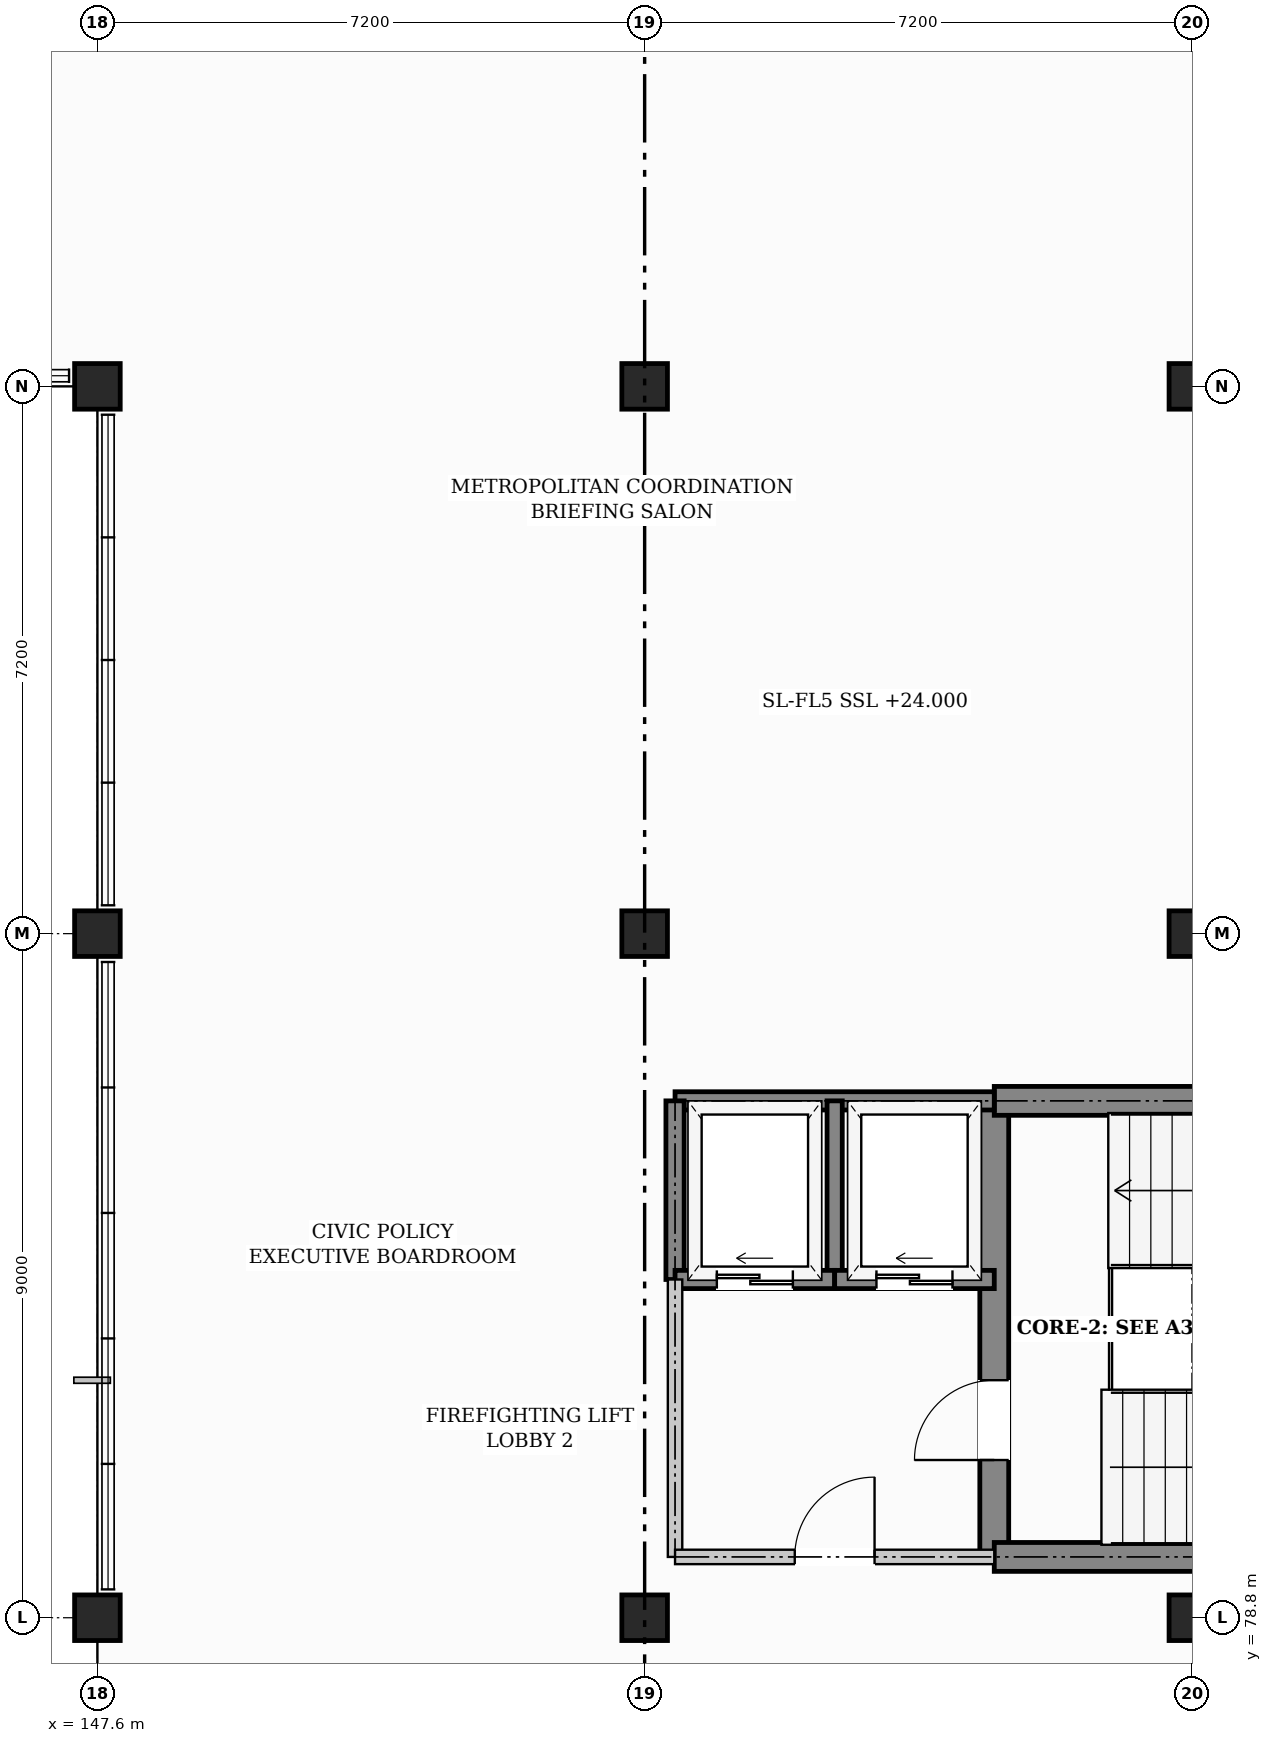
"""IFC4 building model, lengths in metres.
Left out: names, types, materials, properties, quantities, classifications, styles, units other than length and angle.
Written with IfcOpenShell. Run it as: python <this file> out.ifc"""

import sys

from ifc_helpers import new_model, si_unit, direction, frame, frame_2d, origin, origin_2d, place, context, subcontext, project, spatial, rectangle, extrude, element, fill, save


model = new_model("IFC4")
c1 = context("Model", 3, precision=1e-05, world=origin(), true_north=direction((0.0, 1.0)))
c2 = subcontext(c1, "Body", "Model", "MODEL_VIEW")
j1 = project(units=[si_unit("LENGTHUNIT", "METRE"), si_unit("PLANEANGLEUNIT", "RADIAN")], contexts=[c1])
p1 = place(None, origin())
s1 = spatial("IfcSite", under=j1, at=p1, CompositionType="ELEMENT")
p2 = place(p1, origin())
s2 = spatial("IfcBuilding", under=s1, at=p2, CompositionType="ELEMENT")
p3 = place(p2, frame((0.0, 0.0, 24.0)))
s3 = spatial("IfcBuildingStorey", under=s2, at=p3, CompositionType="ELEMENT", Elevation=24.0)
for number, where, z_axis, x_axis in (
    (1, (147.6, 78.8, 0.0), (0.0, 0.0, 1.0), (1.0, 0.0, 0.0)),
    (2, (147.6, 87.8, 0.0), (0.0, 0.0, 1.0), (1.0, 0.0, 0.0)),
    (3, (147.6, 95.0, 0.0), (0.0, 0.0, 1.0), (1.0, 0.0, 0.0)),
    (4, (154.8, 78.8, 0.0), (0.0, 0.0, 1.0), (1.0, 0.0, 0.0)),
    (5, (154.8, 87.8, 0.0), (0.0, 0.0, 1.0), (1.0, 0.0, 0.0)),
    (6, (154.8, 95.0, 0.0), (0.0, 0.0, 1.0), (1.0, 0.0, 0.0)),
    (7, (162.0, 78.8, 0.0), (0.0, 0.0, 1.0), (1.0, 0.0, 0.0)),
    (8, (162.0, 87.8, 0.0), (0.0, 0.0, 1.0), (1.0, 0.0, 0.0)),
    (9, (162.0, 95.0, 0.0), (0.0, 0.0, 1.0), (1.0, 0.0, 0.0)),
):
    element("IfcColumn", number, at=place(p3, frame(where, z_axis=z_axis, x_axis=x_axis)), inside=s3, PredefinedType="COLUMN", context=c2, shape_type="SweptSolid", body=[
        extrude(rectangle(XDim=0.6, YDim=0.6, at=origin_2d()), origin(), (0.0, 0.0, 1.0), 3.6),
    ])
p4 = place(p3, frame((159.4, 79.6, 0.0), z_axis=(0.0, 0.0, 1.0), x_axis=(0.0, 1.0, 0.0)))
e10 = element("IfcWall", 10, at=p4, inside=s3, PredefinedType="SHEAR", context=c2, shape_type="SweptSolid", body=[
    extrude(rectangle(XDim=6.0, YDim=0.38, at=frame_2d((3.0, 0.0))), origin(), (0.0, 0.0, 1.0), 3.34),
])
p5 = place(p4, frame((1.275, 0.0, 0.0)))
e11 = element("IfcOpeningElement", 11, at=p5, cuts=e10, PredefinedType="OPENING", context=c2, shape_type="SweptSolid", body=[
    extrude(rectangle(XDim=1.05, YDim=2.15, at=frame_2d((0.525, 1.075))), frame((0.0, 0.2, 0.0), z_axis=(0.0, -1.0, 0.0), x_axis=(1.0, 0.0, 0.0)), (0.0, 0.0, 1.0), 0.4),
])
for number, where, z_axis, x_axis in (
    (12, (159.4, 79.6, 0.0), (0.0, 0.0, 1.0), (1.0, 0.0, 0.0)),
    (13, (159.4, 85.6, 0.0), (0.0, 0.0, 1.0), (1.0, 0.0, 0.0)),
):
    element("IfcWall", number, at=place(p3, frame(where, z_axis=z_axis, x_axis=x_axis)), inside=s3, PredefinedType="SHEAR", context=c2, shape_type="SweptSolid", body=[
        extrude(rectangle(XDim=7.0, YDim=0.38, at=frame_2d((3.5, 0.0))), origin(), (0.0, 0.0, 1.0), 3.34),
    ])
p6 = place(p3, frame((155.2, 85.6, 0.0), z_axis=(0.0, 0.0, 1.0), x_axis=(1.0, 0.0, 0.0)))
e14 = element("IfcWall", 14, at=p6, inside=s3, PredefinedType="SHEAR", context=c2, shape_type="SweptSolid", body=[
    extrude(rectangle(XDim=4.2, YDim=0.24, at=frame_2d((2.1, 0.0))), origin(), (0.0, 0.0, 1.0), 3.34),
])
p7 = place(p3, frame((155.2, 83.25, 0.0), z_axis=(0.0, 0.0, 1.0), x_axis=(0.0, 1.0, 0.0)))
e15 = element("IfcWall", 15, at=p7, inside=s3, PredefinedType="SHEAR", context=c2, shape_type="SweptSolid", body=[
    extrude(rectangle(XDim=2.35, YDim=0.24, at=frame_2d((1.175, 0.0))), origin(), (0.0, 0.0, 1.0), 3.34),
])
p8 = place(p3, frame((157.3, 83.25, 0.0), z_axis=(0.0, 0.0, 1.0), x_axis=(0.0, 1.0, 0.0)))
e16 = element("IfcWall", 16, at=p8, inside=s3, PredefinedType="SHEAR", context=c2, shape_type="SweptSolid", body=[
    extrude(rectangle(XDim=2.35, YDim=0.2, at=frame_2d((1.175, 0.0))), origin(), (0.0, 0.0, 1.0), 3.34),
])
p9 = place(p3, frame((155.2, 83.25, 0.0), z_axis=(0.0, 0.0, 1.0), x_axis=(1.0, 0.0, 0.0)))
e17 = element("IfcWall", 17, at=p9, inside=s3, PredefinedType="SHEAR", context=c2, shape_type="SweptSolid", body=[
    extrude(rectangle(XDim=2.1, YDim=0.24, at=frame_2d((1.05, 0.0))), origin(), (0.0, 0.0, 1.0), 3.34),
])
p10 = place(p9, frame((0.55, 0.0, 0.0)))
e18 = element("IfcOpeningElement", 18, at=p10, cuts=e17, PredefinedType="OPENING", context=c2, shape_type="SweptSolid", body=[
    extrude(rectangle(XDim=1.0, YDim=2.1, at=frame_2d((0.5, 1.05))), frame((0.0, 0.13, 0.0), z_axis=(0.0, -1.0, 0.0), x_axis=(1.0, 0.0, 0.0)), (0.0, 0.0, 1.0), 0.26),
])
p11 = place(p3, frame((157.3, 83.25, 0.0), z_axis=(0.0, 0.0, 1.0), x_axis=(1.0, 0.0, 0.0)))
e19 = element("IfcWall", 19, at=p11, inside=s3, PredefinedType="SHEAR", context=c2, shape_type="SweptSolid", body=[
    extrude(rectangle(XDim=2.1, YDim=0.24, at=frame_2d((1.05, 0.0))), origin(), (0.0, 0.0, 1.0), 3.34),
])
p12 = place(p11, frame((0.55, 0.0, 0.0)))
e20 = element("IfcOpeningElement", 20, at=p12, cuts=e19, PredefinedType="OPENING", context=c2, shape_type="SweptSolid", body=[
    extrude(rectangle(XDim=1.0, YDim=2.1, at=frame_2d((0.5, 1.05))), frame((0.0, 0.13, 0.0), z_axis=(0.0, -1.0, 0.0), x_axis=(1.0, 0.0, 0.0)), (0.0, 0.0, 1.0), 0.26),
])
p13 = place(p3, frame((155.2, 79.6, 0.0), z_axis=(0.0, 0.0, 1.0), x_axis=(0.0, 1.0, 0.0)))
e21 = element("IfcWall", 21, at=p13, inside=s3, PredefinedType="PARTITIONING", context=c2, shape_type="SweptSolid", body=[
    extrude(rectangle(XDim=3.65, YDim=0.19, at=frame_2d((1.825, 0.0))), origin(), (0.0, 0.0, 1.0), 3.34),
])
p14 = place(p3, frame((155.2, 79.6, 0.0), z_axis=(0.0, 0.0, 1.0), x_axis=(1.0, 0.0, 0.0)))
e22 = element("IfcWall", 22, at=p14, inside=s3, PredefinedType="PARTITIONING", context=c2, shape_type="SweptSolid", body=[
    extrude(rectangle(XDim=4.2, YDim=0.19, at=frame_2d((2.1, 0.0))), origin(), (0.0, 0.0, 1.0), 3.34),
])
p15 = place(p14, frame((1.575, 0.0, 0.0)))
e23 = element("IfcOpeningElement", 23, at=p15, cuts=e22, PredefinedType="OPENING", context=c2, shape_type="SweptSolid", body=[
    extrude(rectangle(XDim=1.05, YDim=2.15, at=frame_2d((0.525, 1.075))), frame((0.0, 0.105, 0.0), z_axis=(0.0, -1.0, 0.0), x_axis=(1.0, 0.0, 0.0)), (0.0, 0.0, 1.0), 0.21),
])
p16 = place(p5, origin())
e24 = element("IfcDoor", 24, at=p16, inside=s3, OperationType="SINGLE_SWING_LEFT", PredefinedType="DOOR", context=c2, shape_type="SweptSolid", body=[
    extrude(rectangle(XDim=1.05, YDim=2.15, at=frame_2d((0.525, 1.075))), frame((0.0, 0.025, 0.0), z_axis=(0.0, -1.0, 0.0), x_axis=(1.0, 0.0, 0.0)), (0.0, 0.0, 1.0), 0.05),
])
fill(e11, e24)
p17 = place(p10, origin())
e25 = element("IfcDoor", 25, at=p17, inside=s3, OperationType="SLIDING_TO_LEFT", PredefinedType="DOOR", context=c2, shape_type="SweptSolid", body=[
    extrude(rectangle(XDim=1.0, YDim=2.1, at=frame_2d((0.5, 1.05))), frame((0.0, 0.025, 0.0), z_axis=(0.0, -1.0, 0.0), x_axis=(1.0, 0.0, 0.0)), (0.0, 0.0, 1.0), 0.05),
])
fill(e18, e25)
p18 = place(p12, origin())
e26 = element("IfcDoor", 26, at=p18, inside=s3, OperationType="SLIDING_TO_LEFT", PredefinedType="DOOR", context=c2, shape_type="SweptSolid", body=[
    extrude(rectangle(XDim=1.0, YDim=2.1, at=frame_2d((0.5, 1.05))), frame((0.0, 0.025, 0.0), z_axis=(0.0, -1.0, 0.0), x_axis=(1.0, 0.0, 0.0)), (0.0, 0.0, 1.0), 0.05),
])
fill(e20, e26)
p19 = place(p15, origin())
e27 = element("IfcDoor", 27, at=p19, inside=s3, OperationType="SINGLE_SWING_RIGHT", PredefinedType="DOOR", context=c2, shape_type="SweptSolid", body=[
    extrude(rectangle(XDim=1.05, YDim=2.15, at=frame_2d((0.525, 1.075))), frame((0.0, 0.025, 0.0), z_axis=(0.0, -1.0, 0.0), x_axis=(1.0, 0.0, 0.0)), (0.0, 0.0, 1.0), 0.05),
])
fill(e23, e27)
save(model, sys.argv[1])
